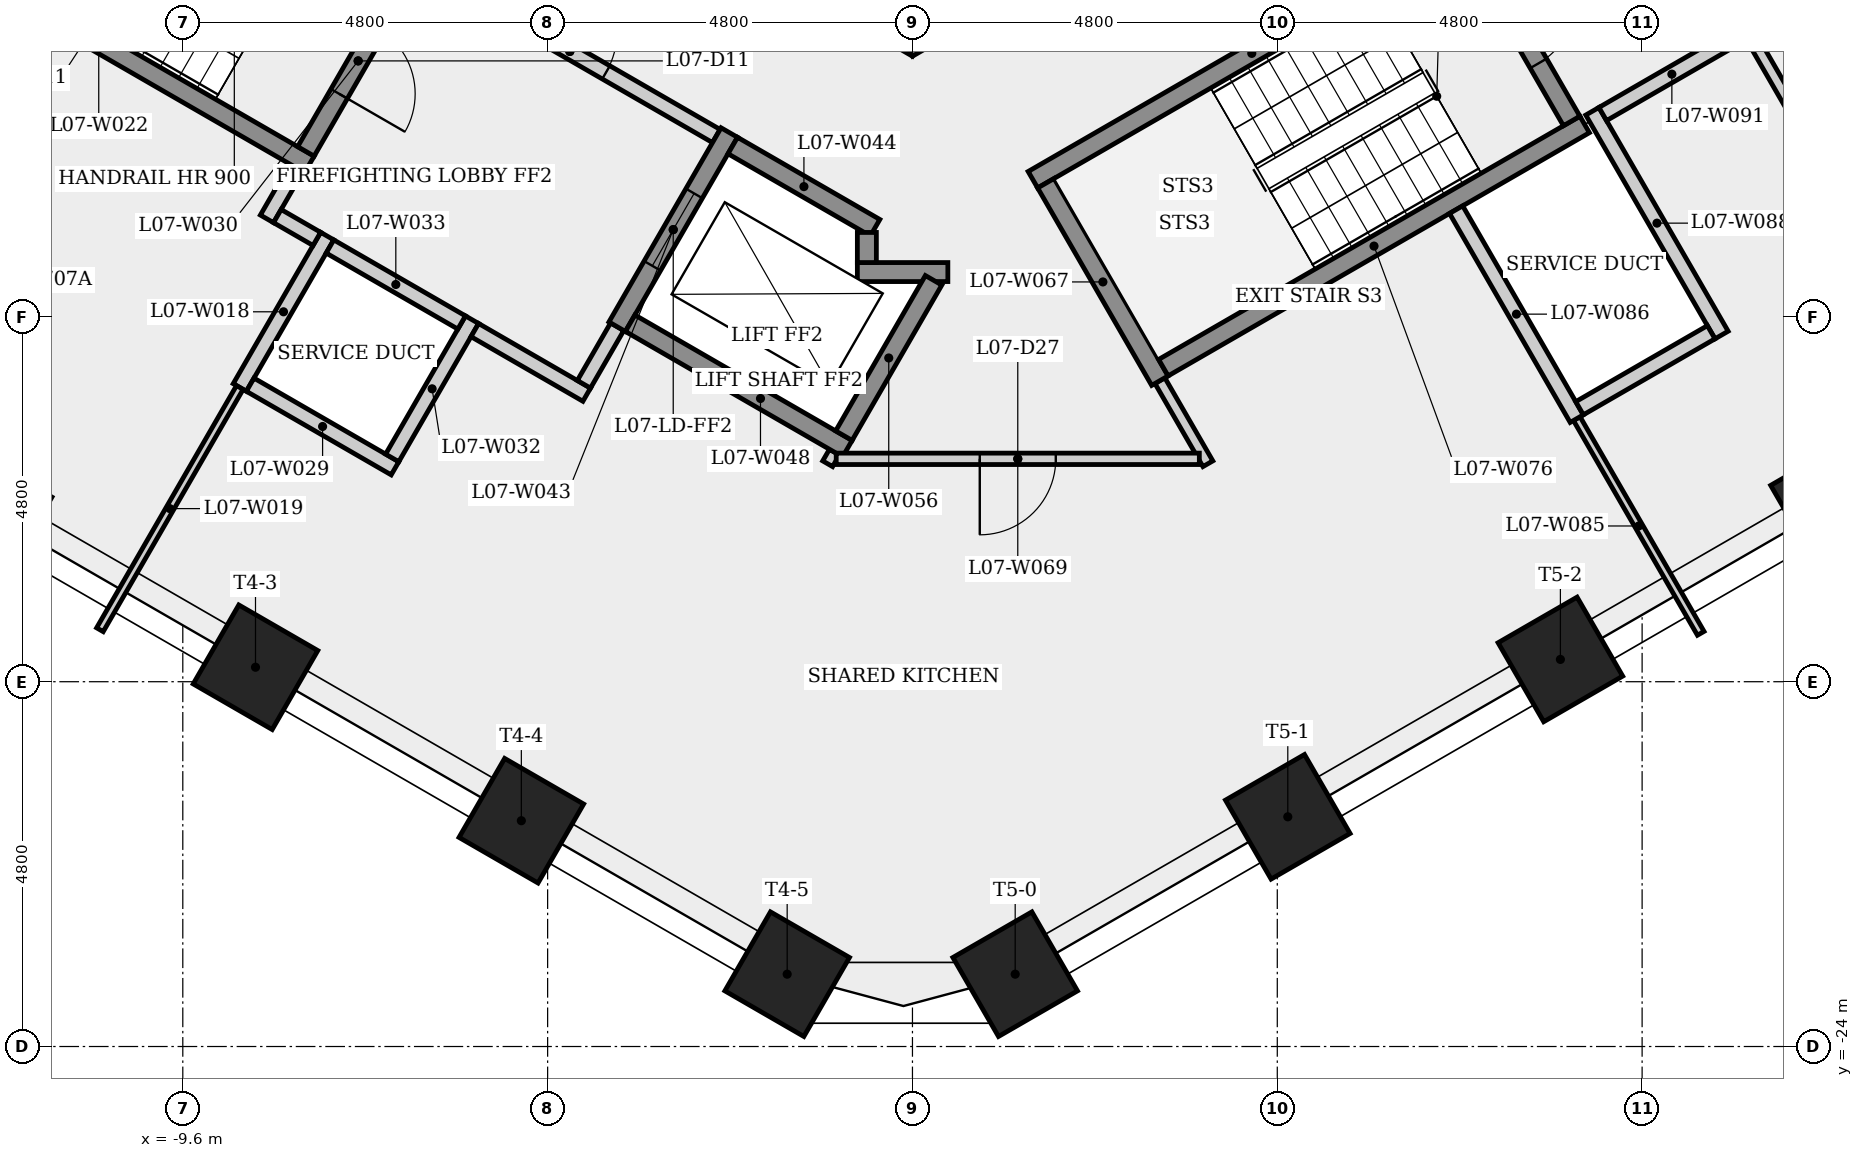
"""IFC4 building model, lengths in metres.
Left out: names, types, materials, properties, quantities, classifications, styles, units other than length and angle.
Written with IfcOpenShell. Run it as: python <this file> out.ifc"""

import sys

from ifc_helpers import new_model, si_unit, direction, frame, frame_2d, origin, origin_2d, place, context, subcontext, project, spatial, rectangle, extrude, element, fill, save


model = new_model("IFC4")
c1 = context("Model", 3, precision=1e-05, world=origin(), true_north=direction((0.0, 1.0)))
c2 = subcontext(c1, "Body", "Model", "MODEL_VIEW")
j1 = project(units=[si_unit("LENGTHUNIT", "METRE"), si_unit("PLANEANGLEUNIT", "RADIAN")], contexts=[c1])
p1 = place(None, origin())
s1 = spatial("IfcSite", under=j1, at=p1, CompositionType="ELEMENT")
p2 = place(p1, origin())
s2 = spatial("IfcBuilding", under=s1, at=p2, CompositionType="ELEMENT")
p3 = place(p2, frame((0.0, 0.0, 32.3)))
s3 = spatial("IfcBuildingStorey", under=s2, at=p3, CompositionType="ELEMENT", Elevation=32.3)
p4 = place(p3, frame((-9.3, -5.138, 0.0), z_axis=(0.0, 0.0, 1.0), x_axis=(0.866023993627, -0.500002442456, 0.0)))
e1 = element("IfcWall", 1, at=p4, inside=s3, PredefinedType="SHEAR", context=c2, shape_type="SweptSolid", body=[
    extrude(rectangle(XDim=10.97, YDim=0.8, at=frame_2d((5.485, 0.0))), origin(), (0.0, 0.0, 1.0), 3.4),
])
p5 = place(p4, frame((2.091, 0.0, 0.0)))
e2 = element("IfcOpeningElement", 2, at=p5, cuts=e1, PredefinedType="OPENING", context=c2, shape_type="SweptSolid", body=[
    extrude(rectangle(XDim=0.9, YDim=2.1, at=frame_2d((0.45, 1.05))), frame((0.0, 0.41, 0.0), z_axis=(0.0, -1.0, 0.0), x_axis=(1.0, 0.0, 0.0)), (0.0, 0.0, 1.0), 0.82),
])
p6 = place(p3, frame((-0.2, -10.623, 0.0), z_axis=(0.0, 0.0, 1.0), x_axis=(0.866023993627, 0.500002442456, 0.0)))
e3 = element("IfcWall", 3, at=p6, inside=s3, PredefinedType="SHEAR", context=c2, shape_type="SweptSolid", body=[
    extrude(rectangle(XDim=10.97, YDim=0.8, at=frame_2d((5.485, 0.0))), origin(), (0.0, 0.0, 1.0), 3.4),
])
p7 = place(p6, frame((4.914, 0.0, 0.0)))
e4 = element("IfcOpeningElement", 4, at=p7, cuts=e3, PredefinedType="OPENING", context=c2, shape_type="SweptSolid", body=[
    extrude(rectangle(XDim=0.9, YDim=2.1, at=frame_2d((0.45, 1.05))), frame((0.0, 0.41, 0.0), z_axis=(0.0, -1.0, 0.0), x_axis=(1.0, 0.0, 0.0)), (0.0, 0.0, 1.0), 0.82),
])
for number, where, z_axis, x_axis in (
    (5, (-12.141, -16.99, 0.0), (0.0, 0.0, 1.0), (-0.5, -0.866, 0.0)),
    (6, (-8.644, -19.01, 0.0), (0.0, 0.0, 1.0), (-0.5, -0.866, 0.0)),
    (7, (-5.146, -21.029, 0.0), (0.0, 0.0, 1.0), (-0.5, -0.866, 0.0)),
    (8, (-1.648, -23.048, 0.0), (0.0, 0.0, 1.0), (-0.5, -0.866, 0.0)),
    (9, (1.352, -23.048, 0.0), (0.0, 0.0, 1.0), (0.5, -0.866, 0.0)),
    (10, (4.938, -20.978, 0.0), (0.0, 0.0, 1.0), (0.5, -0.866, 0.0)),
    (11, (8.525, -18.907, 0.0), (0.0, 0.0, 1.0), (0.5, -0.866, 0.0)),
    (12, (12.111, -16.836, 0.0), (0.0, 0.0, 1.0), (0.5, -0.866, 0.0)),
):
    element("IfcColumn", number, at=place(p3, frame(where, z_axis=z_axis, x_axis=x_axis)), inside=s3, PredefinedType="COLUMN", context=c2, shape_type="SweptSolid", body=[
        extrude(rectangle(XDim=1.2, YDim=1.2, at=origin_2d()), origin(), (0.0, 0.0, 1.0), 3.4),
    ])
p8 = place(p3, frame((-8.85, -15.329, 0.0), z_axis=(0.0, 0.0, 1.0), x_axis=(0.500077740698, 0.865980515519, 0.0)))
e13 = element("IfcWall", 13, at=p8, inside=s3, PredefinedType="PLUMBINGWALL", context=c2, shape_type="SweptSolid", body=[
    extrude(rectangle(XDim=2.3, YDim=0.2, at=frame_2d((1.15, 0.0))), origin(), (0.0, 0.0, 1.0), 3.05),
])
p9 = place(p3, frame((-8.85, -15.329, 0.0), z_axis=(0.0, 0.0, 1.0), x_axis=(-0.499955964762, -0.866050826049, 0.0)))
e14 = element("IfcWall", 14, at=p9, inside=s3, PredefinedType="PARTITIONING", context=c2, shape_type="SweptSolid", body=[
    extrude(rectangle(XDim=3.68, YDim=0.1, at=frame_2d((1.84, 0.0))), origin(), (0.0, 0.0, 1.0), 3.05),
])
p10 = place(p3, frame((-8.493, -13.11, 0.0), z_axis=(0.0, 0.0, 1.0), x_axis=(0.500067724834, 0.865986299303, 0.0)))
e15 = element("IfcWall", 15, at=p10, inside=s3, PredefinedType="PARTITIONING", context=c2, shape_type="SweptSolid", body=[
    extrude(rectangle(XDim=0.775, YDim=0.2, at=frame_2d((0.388, 0.0))), origin(), (0.0, 0.0, 1.0), 3.05),
])
p11 = place(p3, frame((-7.935, -12.393, 0.0), z_axis=(0.0, 0.0, 1.0), x_axis=(-0.866025499775, 0.499999833739, 0.0)))
e16 = element("IfcWall", 16, at=p11, inside=s3, PredefinedType="SHEAR", context=c2, shape_type="SweptSolid", body=[
    extrude(rectangle(XDim=6.4, YDim=0.25, at=frame_2d((3.2, 0.0))), origin(), (0.0, 0.0, 1.0), 3.05),
])
p12 = place(p3, frame((-7.836, -13.373, 0.0), z_axis=(0.0, 0.0, 1.0), x_axis=(-0.866232998003, 0.499640263761, 0.0)))
e17 = element("IfcWall", 17, at=p12, inside=s3, PredefinedType="PARTITIONING", context=c2, shape_type="SweptSolid", body=[
    extrude(rectangle(XDim=0.6, YDim=0.2, at=frame_2d((0.3, 0.0))), origin(), (0.0, 0.0, 1.0), 3.05),
])
p13 = place(p3, frame((-6.808, -16.392, 0.0), z_axis=(0.0, 0.0, 1.0), x_axis=(-0.866008176907, 0.50002983664, 0.0)))
e18 = element("IfcWall", 18, at=p13, inside=s3, PredefinedType="PLUMBINGWALL", context=c2, shape_type="SweptSolid", body=[
    extrude(rectangle(XDim=2.2, YDim=0.2, at=frame_2d((1.1, 0.0))), origin(), (0.0, 0.0, 1.0), 3.05),
])
p14 = place(p3, frame((-6.605, -9.841, 0.0), z_axis=(0.0, 0.0, 1.0), x_axis=(-0.499996545922, -0.866027397988, 0.0)))
e19 = element("IfcWall", 19, at=p14, inside=s3, PredefinedType="SHEAR", context=c2, shape_type="SweptSolid", body=[
    extrude(rectangle(XDim=2.75, YDim=0.25, at=frame_2d((1.375, 0.0))), origin(), (0.0, 0.0, 1.0), 3.05),
])
p15 = place(p14, frame((0.875, 0.0, 0.0)))
e20 = element("IfcOpeningElement", 20, at=p15, cuts=e19, PredefinedType="OPENING", context=c2, shape_type="SweptSolid", body=[
    extrude(rectangle(XDim=1.0, YDim=2.1, at=frame_2d((0.5, 1.05))), frame((0.0, 0.135, 0.0), z_axis=(0.0, -1.0, 0.0), x_axis=(1.0, 0.0, 0.0)), (0.0, 0.0, 1.0), 0.27),
])
p16 = place(p3, frame((-6.435, -9.795, 0.0), z_axis=(0.0, 0.0, 1.0), x_axis=(0.866012907634, -0.500021643343, 0.0)))
e21 = element("IfcWall", 21, at=p16, inside=s3, PredefinedType="PARTITIONING", context=c2, shape_type="SweptSolid", body=[
    extrude(rectangle(XDim=4.45, YDim=0.2, at=frame_2d((2.225, 0.0))), origin(), (0.0, 0.0, 1.0), 3.05),
])
p17 = place(p16, frame((1.675, 0.0, 0.0)))
e22 = element("IfcOpeningElement", 22, at=p17, cuts=e21, PredefinedType="OPENING", context=c2, shape_type="SweptSolid", body=[
    extrude(rectangle(XDim=1.1, YDim=2.1, at=frame_2d((0.55, 1.05))), frame((0.0, 0.11, 0.0), z_axis=(0.0, -1.0, 0.0), x_axis=(1.0, 0.0, 0.0)), (0.0, 0.0, 1.0), 0.22),
])
p18 = place(p3, frame((-5.795, -14.437, 0.0), z_axis=(0.0, 0.0, 1.0), x_axis=(-0.500027713859, -0.866009402589, 0.0)))
e23 = element("IfcWall", 23, at=p18, inside=s3, PredefinedType="PLUMBINGWALL", context=c2, shape_type="SweptSolid", body=[
    extrude(rectangle(XDim=2.1, YDim=0.2, at=frame_2d((1.05, 0.0))), origin(), (0.0, 0.0, 1.0), 3.05),
])
p19 = place(p3, frame((-5.931, -14.473, 0.0), z_axis=(0.0, 0.0, 1.0), x_axis=(-0.866041268327, 0.499972520799, 0.0)))
e24 = element("IfcWall", 24, at=p19, inside=s3, PredefinedType="PLUMBINGWALL", context=c2, shape_type="SweptSolid", body=[
    extrude(rectangle(XDim=2.0, YDim=0.2, at=frame_2d((1.0, 0.0))), origin(), (0.0, 0.0, 1.0), 3.05),
])
p20 = place(p3, frame((-4.286, -15.423, 0.0), z_axis=(0.0, 0.0, 1.0), x_axis=(-0.866025371046, 0.500000056704, 0.0)))
e25 = element("IfcWall", 25, at=p20, inside=s3, PredefinedType="PARTITIONING", context=c2, shape_type="SweptSolid", body=[
    extrude(rectangle(XDim=1.7, YDim=0.2, at=frame_2d((0.85, 0.0))), origin(), (0.0, 0.0, 1.0), 3.05),
])
p21 = place(p3, frame((-3.885, -14.529, 0.0), z_axis=(0.0, 0.0, 1.0), x_axis=(-0.499859285417, -0.866106630146, 0.0)))
e26 = element("IfcWall", 26, at=p21, inside=s3, PredefinedType="PARTITIONING", context=c2, shape_type="SweptSolid", body=[
    extrude(rectangle(XDim=0.875, YDim=0.2, at=frame_2d((0.438, 0.0))), origin(), (0.0, 0.0, 1.0), 3.05),
])
p22 = place(p3, frame((-2.41, -11.974, 0.0), z_axis=(0.0, 0.0, 1.0), x_axis=(-0.500001826776, -0.866024349092, 0.0)))
e27 = element("IfcWall", 27, at=p22, inside=s3, PredefinedType="SHEAR", context=c2, shape_type="SweptSolid", body=[
    extrude(rectangle(XDim=2.95, YDim=0.25, at=frame_2d((1.475, 0.0))), origin(), (0.0, 0.0, 1.0), 3.05),
])
p23 = place(p22, frame((0.925, 0.0, 0.0)))
e28 = element("IfcOpeningElement", 28, at=p23, cuts=e27, PredefinedType="OPENING", context=c2, shape_type="SweptSolid", body=[
    extrude(rectangle(XDim=1.1, YDim=2.1, at=frame_2d((0.55, 1.05))), frame((0.0, 0.135, 0.0), z_axis=(0.0, -1.0, 0.0), x_axis=(1.0, 0.0, 0.0)), (0.0, 0.0, 1.0), 0.27),
])
p24 = place(p3, frame((-2.364, -12.145, 0.0), z_axis=(0.0, 0.0, 1.0), x_axis=(0.86603892542, -0.499976579108, 0.0)))
e29 = element("IfcWall", 29, at=p24, inside=s3, PredefinedType="SHEAR", context=c2, shape_type="SweptSolid", body=[
    extrude(rectangle(XDim=2.162, YDim=0.25, at=frame_2d((1.081, 0.0))), origin(), (0.0, 0.0, 1.0), 3.05),
])
p25 = place(p3, frame((-1.115, -16.332, 0.0), z_axis=(0.0, 0.0, 1.0), x_axis=(0.499403939877, 0.866369265865, 0.0)))
e30 = element("IfcWall", 30, at=p25, inside=s3, PredefinedType="PARTITIONING", context=c2, shape_type="SweptSolid", body=[
    extrude(rectangle(XDim=0.177, YDim=0.15, at=frame_2d((0.088, 0.0))), origin(), (0.0, 0.0, 1.0), 3.05),
])
p26 = place(p3, frame((-0.856, -16.133, 0.0), z_axis=(0.0, 0.0, 1.0), x_axis=(-0.866021716278, 0.500006386895, 0.0)))
e31 = element("IfcWall", 31, at=p26, inside=s3, PredefinedType="SHEAR", context=c2, shape_type="SweptSolid", body=[
    extrude(rectangle(XDim=3.3, YDim=0.25, at=frame_2d((1.65, 0.0))), origin(), (0.0, 0.0, 1.0), 3.05),
])
p27 = place(p3, frame((-0.725, -13.81, 0.0), z_axis=(0.0, 0.0, 1.0), x_axis=(1.0, 0.0, 0.0)))
e32 = element("IfcWall", 32, at=p27, inside=s3, PredefinedType="SHEAR", context=c2, shape_type="SweptSolid", body=[
    extrude(rectangle(XDim=1.191, YDim=0.25, at=frame_2d((0.595, 0.0))), origin(), (0.0, 0.0, 1.0), 3.05),
])
p28 = place(p3, frame((-0.6, -13.289, 0.0), z_axis=(0.0, 0.0, 1.0), x_axis=(0.0, -1.0, 0.0)))
e33 = element("IfcWall", 33, at=p28, inside=s3, PredefinedType="SHEAR", context=c2, shape_type="SweptSolid", body=[
    extrude(rectangle(XDim=0.396, YDim=0.25, at=frame_2d((0.198, 0.0))), origin(), (0.0, 0.0, 1.0), 3.4),
])
p29 = place(p3, frame((0.278, -13.918, 0.0), z_axis=(0.0, 0.0, 1.0), x_axis=(-0.49998806882, -0.866032292145, 0.0)))
e34 = element("IfcWall", 34, at=p29, inside=s3, PredefinedType="SHEAR", context=c2, shape_type="SweptSolid", body=[
    extrude(rectangle(XDim=2.36, YDim=0.25, at=frame_2d((1.18, 0.0))), origin(), (0.0, 0.0, 1.0), 3.4),
])
p30 = place(p3, frame((1.585, -12.595, 0.0), z_axis=(0.0, 0.0, 1.0), x_axis=(0.866036417653, 0.499980922934, 0.0)))
e35 = element("IfcWall", 35, at=p30, inside=s3, PredefinedType="SHEAR", context=c2, shape_type="SweptSolid", body=[
    extrude(rectangle(XDim=6.65, YDim=0.25, at=frame_2d((3.325, 0.0))), origin(), (0.0, 0.0, 1.0), 3.05),
])
p31 = place(p30, frame((5.275, 0.0, 0.0)))
e36 = element("IfcOpeningElement", 36, at=p31, cuts=e35, PredefinedType="OPENING", context=c2, shape_type="SweptSolid", body=[
    extrude(rectangle(XDim=1.0, YDim=2.1, at=frame_2d((0.5, 1.05))), frame((0.0, 0.135, 0.0), z_axis=(0.0, -1.0, 0.0), x_axis=(1.0, 0.0, 0.0)), (0.0, 0.0, 1.0), 0.27),
])
p32 = place(p3, frame((3.256, -15.239, 0.0), z_axis=(0.0, 0.0, 1.0), x_axis=(0.500006981563, -0.86602137294, 0.0)))
e37 = element("IfcWall", 37, at=p32, inside=s3, PredefinedType="PARTITIONING", context=c2, shape_type="SweptSolid", body=[
    extrude(rectangle(XDim=1.263, YDim=0.15, at=frame_2d((0.631, 0.0))), origin(), (0.0, 0.0, 1.0), 3.05),
])
p33 = place(p3, frame((3.256, -15.239, 0.0), z_axis=(0.0, 0.0, 1.0), x_axis=(-0.50002537861, 0.866010750942, 0.0)))
e38 = element("IfcWall", 38, at=p33, inside=s3, PredefinedType="SHEAR", context=c2, shape_type="SweptSolid", body=[
    extrude(rectangle(XDim=3.0, YDim=0.25, at=frame_2d((1.5, 0.0))), origin(), (0.0, 0.0, 1.0), 3.05),
])
p34 = place(p3, frame((3.774, -16.267, 0.0), z_axis=(0.0, 0.0, 1.0), x_axis=(-1.0, 0.0, 0.0)))
e39 = element("IfcWall", 39, at=p34, inside=s3, PredefinedType="PARTITIONING", context=c2, shape_type="SweptSolid", body=[
    extrude(rectangle(XDim=4.778, YDim=0.15, at=frame_2d((2.389, 0.0))), origin(), (0.0, 0.0, 1.0), 3.05),
])
p35 = place(p34, frame((1.889, 0.0, 0.0)))
e40 = element("IfcOpeningElement", 40, at=p35, cuts=e39, PredefinedType="OPENING", context=c2, shape_type="SweptSolid", body=[
    extrude(rectangle(XDim=1.0, YDim=2.1, at=frame_2d((0.5, 1.05))), frame((0.0, 0.085, 0.0), z_axis=(0.0, -1.0, 0.0), x_axis=(1.0, 0.0, 0.0)), (0.0, 0.0, 1.0), 0.17),
])
p36 = place(p3, frame((3.301, -15.068, 0.0), z_axis=(0.0, 0.0, 1.0), x_axis=(0.866035036182, 0.499983315828, 0.0)))
e41 = element("IfcWall", 41, at=p36, inside=s3, PredefinedType="SHEAR", context=c2, shape_type="SweptSolid", body=[
    extrude(rectangle(XDim=6.4, YDim=0.25, at=frame_2d((3.2, 0.0))), origin(), (0.0, 0.0, 1.0), 3.05),
])
p37 = place(p3, frame((7.298, -9.441, 0.0), z_axis=(0.0, 0.0, 1.0), x_axis=(0.500034990121, -0.866005201286, 0.0)))
e42 = element("IfcWall", 42, at=p37, inside=s3, PredefinedType="SHEAR", context=c2, shape_type="SweptSolid", body=[
    extrude(rectangle(XDim=2.75, YDim=0.25, at=frame_2d((1.375, 0.0))), origin(), (0.0, 0.0, 1.0), 3.05),
])
p38 = place(p37, frame((0.875, 0.0, 0.0)))
e43 = element("IfcOpeningElement", 43, at=p38, cuts=e42, PredefinedType="OPENING", context=c2, shape_type="SweptSolid", body=[
    extrude(rectangle(XDim=1.0, YDim=2.1, at=frame_2d((0.5, 1.05))), frame((0.0, 0.135, 0.0), z_axis=(0.0, -1.0, 0.0), x_axis=(1.0, 0.0, 0.0)), (0.0, 0.0, 1.0), 0.27),
])
p39 = place(p3, frame((8.74, -15.738, 0.0), z_axis=(0.0, 0.0, 1.0), x_axis=(0.499994537821, -0.866028557352, 0.0)))
e44 = element("IfcWall", 44, at=p39, inside=s3, PredefinedType="PARTITIONING", context=c2, shape_type="SweptSolid", body=[
    extrude(rectangle(XDim=3.262, YDim=0.1, at=frame_2d((1.631, 0.0))), origin(), (0.0, 0.0, 1.0), 3.05),
])
p40 = place(p3, frame((8.74, -15.739, 0.0), z_axis=(0.0, 0.0, 1.0), x_axis=(-0.500017526161, 0.866015284814, 0.0)))
e45 = element("IfcWall", 45, at=p40, inside=s3, PredefinedType="PLUMBINGWALL", context=c2, shape_type="SweptSolid", body=[
    extrude(rectangle(XDim=3.175, YDim=0.2, at=frame_2d((1.588, 0.0))), origin(), (0.0, 0.0, 1.0), 3.05),
])
p41 = place(p3, frame((8.945, -11.694, 0.0), z_axis=(0.0, 0.0, 1.0), x_axis=(0.500062241894, -0.865989465428, 0.0)))
e46 = element("IfcWall", 46, at=p41, inside=s3, PredefinedType="PLUMBINGWALL", context=c2, shape_type="SweptSolid", body=[
    extrude(rectangle(XDim=3.4, YDim=0.2, at=frame_2d((1.7, 0.0))), origin(), (0.0, 0.0, 1.0), 3.05),
])
p42 = place(p3, frame((10.509, -14.602, 0.0), z_axis=(0.0, 0.0, 1.0), x_axis=(-0.866010750942, -0.50002537861, 0.0)))
e47 = element("IfcWall", 47, at=p42, inside=s3, PredefinedType="PLUMBINGWALL", context=c2, shape_type="SweptSolid", body=[
    extrude(rectangle(XDim=2.0, YDim=0.2, at=frame_2d((1.0, 0.0))), origin(), (0.0, 0.0, 1.0), 3.05),
])
p43 = place(p3, frame((10.901, -10.681, 0.0), z_axis=(0.0, 0.0, 1.0), x_axis=(-0.866009402589, -0.500027713859, 0.0)))
e48 = element("IfcWall", 48, at=p43, inside=s3, PredefinedType="PARTITIONING", context=c2, shape_type="SweptSolid", body=[
    extrude(rectangle(XDim=2.1, YDim=0.2, at=frame_2d((1.05, 0.0))), origin(), (0.0, 0.0, 1.0), 3.05),
])
p44 = place(p3, frame((12.547, -13.332, 0.0), z_axis=(0.0, 0.0, 1.0), x_axis=(-0.499965068118, 0.866045570776, 0.0)))
e49 = element("IfcWall", 49, at=p44, inside=s3, PredefinedType="PARTITIONING", context=c2, shape_type="SweptSolid", body=[
    extrude(rectangle(XDim=3.02, YDim=0.15, at=frame_2d((1.51, 0.0))), origin(), (0.0, 0.0, 1.0), 3.05),
])
p45 = place(p15, origin())
e50 = element("IfcDoor", 50, at=p45, inside=s3, OperationType="SINGLE_SWING_RIGHT", PredefinedType="DOOR", context=c2, shape_type="SweptSolid", body=[
    extrude(rectangle(XDim=1.0, YDim=2.1, at=frame_2d((0.5, 1.05))), frame((0.0, 0.025, 0.0), z_axis=(0.0, -1.0, 0.0), x_axis=(1.0, 0.0, 0.0)), (0.0, 0.0, 1.0), 0.05),
])
fill(e20, e50)
p46 = place(p17, origin())
e51 = element("IfcDoor", 51, at=p46, inside=s3, OperationType="SINGLE_SWING_LEFT", PredefinedType="DOOR", context=c2, shape_type="SweptSolid", body=[
    extrude(rectangle(XDim=1.1, YDim=2.1, at=frame_2d((0.55, 1.05))), frame((0.0, 0.025, 0.0), z_axis=(0.0, -1.0, 0.0), x_axis=(1.0, 0.0, 0.0)), (0.0, 0.0, 1.0), 0.05),
])
fill(e22, e51)
p47 = place(p23, origin())
e52 = element("IfcDoor", 52, at=p47, inside=s3, OperationType="SLIDING_TO_LEFT", PredefinedType="DOOR", context=c2, shape_type="SweptSolid", body=[
    extrude(rectangle(XDim=1.1, YDim=2.1, at=frame_2d((0.55, 1.05))), frame((0.0, 0.025, 0.0), z_axis=(0.0, -1.0, 0.0), x_axis=(1.0, 0.0, 0.0)), (0.0, 0.0, 1.0), 0.05),
])
fill(e28, e52)
p48 = place(p38, origin())
e53 = element("IfcDoor", 53, at=p48, inside=s3, OperationType="SINGLE_SWING_LEFT", PredefinedType="DOOR", context=c2, shape_type="SweptSolid", body=[
    extrude(rectangle(XDim=1.0, YDim=2.1, at=frame_2d((0.5, 1.05))), frame((0.0, 0.025, 0.0), z_axis=(0.0, -1.0, 0.0), x_axis=(1.0, 0.0, 0.0)), (0.0, 0.0, 1.0), 0.05),
])
fill(e43, e53)
p49 = place(p35, origin())
e54 = element("IfcDoor", 54, at=p49, inside=s3, OperationType="SINGLE_SWING_RIGHT", PredefinedType="DOOR", context=c2, shape_type="SweptSolid", body=[
    extrude(rectangle(XDim=1.0, YDim=2.1, at=frame_2d((0.5, 1.05))), frame((0.0, 0.025, 0.0), z_axis=(0.0, -1.0, 0.0), x_axis=(1.0, 0.0, 0.0)), (0.0, 0.0, 1.0), 0.05),
])
fill(e40, e54)
save(model, sys.argv[1])
